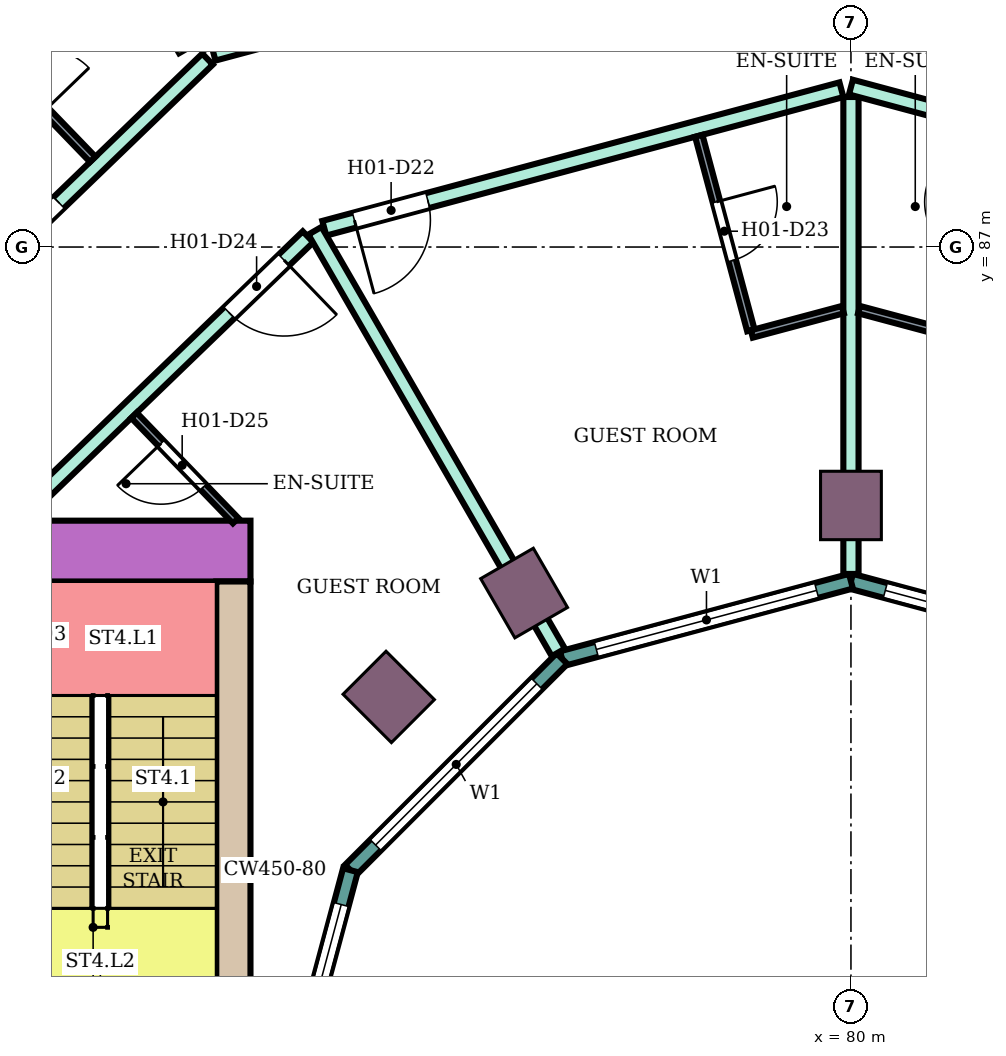
"""IFC4 building model, lengths in metres.
Left out: names, types, materials, properties, quantities, classifications, styles, units other than length and angle.
Written with IfcOpenShell. Run it as: python <this file> out.ifc"""

import sys

from ifc_helpers import new_model, si_unit, direction, frame, frame_2d, origin, origin_2d, place, context, subcontext, project, spatial, rectangle, extrude, element, fill, save


model = new_model("IFC4")
c1 = context("Model", 3, precision=1e-05, world=origin(), true_north=direction((0.0, 1.0)))
c2 = subcontext(c1, "Body", "Model", "MODEL_VIEW")
j1 = project(units=[si_unit("LENGTHUNIT", "METRE"), si_unit("PLANEANGLEUNIT", "RADIAN")], contexts=[c1])
p1 = place(None, origin())
s1 = spatial("IfcSite", under=j1, at=p1, CompositionType="ELEMENT")
p2 = place(p1, origin())
s2 = spatial("IfcBuilding", under=s1, at=p2, CompositionType="ELEMENT")
p3 = place(p2, frame((0.0, 0.0, 36.4)))
s3 = spatial("IfcBuildingStorey", under=s2, at=p3, CompositionType="ELEMENT", Elevation=36.4)
p4 = place(p3, frame((71.2, 90.242, 0.0), z_axis=(0.0, 0.0, 1.0), x_axis=(-0.5, 0.866025403784, 0.0)))
e1 = element("IfcColumn", 1, at=p4, inside=s3, PredefinedType="COLUMN", context=c2, shape_type="SweptSolid", body=[
    extrude(rectangle(XDim=1.2, YDim=0.8, at=origin_2d()), origin(), (0.0, 0.0, 1.0), 3.8),
])
for number, where, z_axis, x_axis in (
    (2, (80.0, 83.6, 0.0), (0.0, 0.0, 1.0), (0.0, 1.0, 0.0)),
    (3, (75.7, 82.448, 0.0), (0.0, 0.0, 1.0), (-0.5, 0.866, 0.0)),
    (4, (73.919, 81.081, 0.0), (0.0, 0.0, 1.0), (-0.707, 0.707, 0.0)),
):
    element("IfcColumn", number, at=place(p3, frame(where, z_axis=z_axis, x_axis=x_axis)), inside=s3, PredefinedType="COLUMN", context=c2, shape_type="SweptSolid", body=[
        extrude(rectangle(XDim=0.9, YDim=0.8, at=origin_2d()), origin(), (0.0, 0.0, 1.0), 3.8),
    ])
p5 = place(p3, frame((72.1, 83.0, 0.0), z_axis=(0.0, 0.0, 1.0), x_axis=(-1.0, 0.0, 0.0)))
e5 = element("IfcWall", 5, at=p5, inside=s3, PredefinedType="SHEAR", context=c2, shape_type="SweptSolid", body=[
    extrude(rectangle(XDim=14.7, YDim=0.8, at=frame_2d((7.35, 0.0))), origin(), (0.0, 0.0, 1.0), 3.48),
])
p6 = place(p5, frame((4.2, 0.0, 0.0)))
e6 = element("IfcOpeningElement", 6, at=p6, cuts=e5, PredefinedType="OPENING", context=c2, shape_type="SweptSolid", body=[
    extrude(rectangle(XDim=2.4, YDim=2.4, at=frame_2d((1.2, 1.2))), frame((0.0, 0.41, 0.0), z_axis=(0.0, -1.0, 0.0), x_axis=(1.0, 0.0, 0.0)), (0.0, 0.0, 1.0), 0.82),
])
p7 = place(p3, frame((71.875, 82.6, 0.0), z_axis=(0.0, 0.0, 1.0), x_axis=(0.0, -1.0, 0.0)))
e7 = element("IfcWall", 7, at=p7, inside=s3, PredefinedType="SHEAR", context=c2, shape_type="SweptSolid", body=[
    extrude(rectangle(XDim=7.6, YDim=0.45, at=frame_2d((3.8, 0.0))), origin(), (0.0, 0.0, 1.0), 3.48),
])
p8 = place(p3, frame((83.802, 81.585, 0.0), z_axis=(0.0, 0.0, 1.0), x_axis=(-0.965933654434, 0.258789828301, 0.0)))
e8 = element("IfcWall", 8, at=p8, inside=s3, PredefinedType="NOTDEFINED", context=c2, shape_type="SweptSolid", body=[
    extrude(rectangle(XDim=3.936, YDim=0.2, at=frame_2d((1.968, 0.0))), origin(), (0.0, 0.0, 1.0), 3.8),
])
p9 = place(p8, frame((0.468, 0.0, 0.9)))
e9 = element("IfcOpeningElement", 9, at=p9, cuts=e8, PredefinedType="OPENING", context=c2, shape_type="SweptSolid", body=[
    extrude(rectangle(XDim=3.0, YDim=2.3, at=frame_2d((1.5, 1.15))), frame((0.0, 0.11, 0.0), z_axis=(0.0, -1.0, 0.0), x_axis=(1.0, 0.0, 0.0)), (0.0, 0.0, 1.0), 0.22),
])
p10 = place(p3, frame((80.0, 82.604, 0.0), z_axis=(0.0, 0.0, 1.0), x_axis=(-0.965933654434, -0.258789828301, 0.0)))
e10 = element("IfcWall", 10, at=p10, inside=s3, PredefinedType="NOTDEFINED", context=c2, shape_type="SweptSolid", body=[
    extrude(rectangle(XDim=3.936, YDim=0.2, at=frame_2d((1.968, 0.0))), origin(), (0.0, 0.0, 1.0), 3.8),
])
p11 = place(p10, frame((0.468, 0.0, 0.9)))
e11 = element("IfcOpeningElement", 11, at=p11, cuts=e10, PredefinedType="OPENING", context=c2, shape_type="SweptSolid", body=[
    extrude(rectangle(XDim=3.0, YDim=2.3, at=frame_2d((1.5, 1.15))), frame((0.0, 0.11, 0.0), z_axis=(0.0, -1.0, 0.0), x_axis=(1.0, 0.0, 0.0)), (0.0, 0.0, 1.0), 0.22),
])
p12 = place(p3, frame((76.198, 81.585, 0.0), z_axis=(0.0, 0.0, 1.0), x_axis=(-0.707106781187, -0.707106781187, 0.0)))
e12 = element("IfcWall", 12, at=p12, inside=s3, PredefinedType="NOTDEFINED", context=c2, shape_type="SweptSolid", body=[
    extrude(rectangle(XDim=3.936, YDim=0.2, at=frame_2d((1.968, 0.0))), origin(), (0.0, 0.0, 1.0), 3.8),
])
p13 = place(p12, frame((0.468, 0.0, 0.9)))
e13 = element("IfcOpeningElement", 13, at=p13, cuts=e12, PredefinedType="OPENING", context=c2, shape_type="SweptSolid", body=[
    extrude(rectangle(XDim=3.0, YDim=2.3, at=frame_2d((1.5, 1.15))), frame((0.0, 0.11, 0.0), z_axis=(0.0, -1.0, 0.0), x_axis=(1.0, 0.0, 0.0)), (0.0, 0.0, 1.0), 0.22),
])
p14 = place(p3, frame((73.415, 78.802, 0.0), z_axis=(0.0, 0.0, 1.0), x_axis=(-0.258789828301, -0.965933654434, 0.0)))
e14 = element("IfcWall", 14, at=p14, inside=s3, PredefinedType="NOTDEFINED", context=c2, shape_type="SweptSolid", body=[
    extrude(rectangle(XDim=3.936, YDim=0.2, at=frame_2d((1.968, 0.0))), origin(), (0.0, 0.0, 1.0), 3.8),
])
p15 = place(p14, frame((0.468, 0.0, 0.9)))
e15 = element("IfcOpeningElement", 15, at=p15, cuts=e14, PredefinedType="OPENING", context=c2, shape_type="SweptSolid", body=[
    extrude(rectangle(XDim=3.0, YDim=2.3, at=frame_2d((1.5, 1.15))), frame((0.0, 0.11, 0.0), z_axis=(0.0, -1.0, 0.0), x_axis=(1.0, 0.0, 0.0)), (0.0, 0.0, 1.0), 0.22),
])
p16 = place(p3, frame((66.796, 84.9, 0.0), z_axis=(0.0, 0.0, 1.0), x_axis=(0.719690131178, 0.694295409092, 0.0)))
e16 = element("IfcWall", 16, at=p16, inside=s3, PredefinedType="PARTITIONING", context=c2, shape_type="SweptSolid", body=[
    extrude(rectangle(XDim=6.585, YDim=0.2, at=frame_2d((3.293, 0.0))), origin(), (0.0, 0.0, 1.0), 3.35),
])
p17 = place(p16, frame((2.867, 0.0, 0.0)))
e17 = element("IfcOpeningElement", 17, at=p17, cuts=e16, PredefinedType="OPENING", context=c2, shape_type="SweptSolid", body=[
    extrude(rectangle(XDim=1.0, YDim=2.1, at=frame_2d((0.5, 1.05))), frame((0.0, 0.11, 0.0), z_axis=(0.0, -1.0, 0.0), x_axis=(1.0, 0.0, 0.0)), (0.0, 0.0, 1.0), 0.22),
])
p18 = place(p3, frame((68.987, 83.4, 0.0), z_axis=(0.0, 0.0, 1.0), x_axis=(0.719591503389, 0.694397629784, 0.0)))
e18 = element("IfcWall", 18, at=p18, inside=s3, PredefinedType="PARTITIONING", context=c2, shape_type="SweptSolid", body=[
    extrude(rectangle(XDim=5.378, YDim=0.2, at=frame_2d((2.689, 0.0))), origin(), (0.0, 0.0, 1.0), 3.35),
])
p19 = place(p18, frame((3.938, 0.0, 0.0)))
e19 = element("IfcOpeningElement", 19, at=p19, cuts=e18, PredefinedType="OPENING", context=c2, shape_type="SweptSolid", body=[
    extrude(rectangle(XDim=1.0, YDim=2.1, at=frame_2d((0.5, 1.05))), frame((0.0, 0.11, 0.0), z_axis=(0.0, -1.0, 0.0), x_axis=(1.0, 0.0, 0.0)), (0.0, 0.0, 1.0), 0.22),
])
p20 = place(p3, frame((71.614, 89.55, 0.0), z_axis=(0.0, 0.0, 1.0), x_axis=(0.965982156828, 0.258608725086, 0.0)))
e20 = element("IfcWall", 20, at=p20, inside=s3, PredefinedType="PARTITIONING", context=c2, shape_type="SweptSolid", body=[
    extrude(rectangle(XDim=8.592, YDim=0.2, at=frame_2d((4.296, 0.0))), origin(), (0.0, 0.0, 1.0), 3.35),
])
p21 = place(p20, frame((4.865, 0.0, 0.0)))
e21 = element("IfcOpeningElement", 21, at=p21, cuts=e20, PredefinedType="OPENING", context=c2, shape_type="SweptSolid", body=[
    extrude(rectangle(XDim=1.0, YDim=2.1, at=frame_2d((0.5, 1.05))), frame((0.0, 0.11, 0.0), z_axis=(0.0, -1.0, 0.0), x_axis=(1.0, 0.0, 0.0)), (0.0, 0.0, 1.0), 0.22),
])
p22 = place(p20, frame((2.804, 0.0, 0.0)))
e22 = element("IfcOpeningElement", 22, at=p22, cuts=e20, PredefinedType="OPENING", context=c2, shape_type="SweptSolid", body=[
    extrude(rectangle(XDim=1.0, YDim=2.1, at=frame_2d((0.5, 1.05))), frame((0.0, 0.11, 0.0), z_axis=(0.0, -1.0, 0.0), x_axis=(1.0, 0.0, 0.0)), (0.0, 0.0, 1.0), 0.22),
])
p23 = place(p3, frame((73.071, 87.247, 0.0), z_axis=(0.0, 0.0, 1.0), x_axis=(0.965931651205, 0.258797305243, 0.0)))
e23 = element("IfcWall", 23, at=p23, inside=s3, PredefinedType="PARTITIONING", context=c2, shape_type="SweptSolid", body=[
    extrude(rectangle(XDim=7.043, YDim=0.2, at=frame_2d((3.521, 0.0))), origin(), (0.0, 0.0, 1.0), 3.35),
])
p24 = place(p23, frame((0.41, 0.0, 0.0)))
e24 = element("IfcOpeningElement", 24, at=p24, cuts=e23, PredefinedType="OPENING", context=c2, shape_type="SweptSolid", body=[
    extrude(rectangle(XDim=1.0, YDim=2.1, at=frame_2d((0.5, 1.05))), frame((0.0, 0.11, 0.0), z_axis=(0.0, -1.0, 0.0), x_axis=(1.0, 0.0, 0.0)), (0.0, 0.0, 1.0), 0.22),
])
p25 = place(p3, frame((72.948, 87.214, 0.0), z_axis=(0.0, 0.0, 1.0), x_axis=(0.499943524694, -0.866058007363, 0.0)))
e25 = element("IfcWall", 25, at=p25, inside=s3, PredefinedType="PARTITIONING", context=c2, shape_type="SweptSolid", body=[
    extrude(rectangle(XDim=6.405, YDim=0.2, at=frame_2d((3.203, 0.0))), origin(), (0.0, 0.0, 1.0), 3.35),
])
p26 = place(p3, frame((80.0, 82.699, 0.0), z_axis=(0.0, 0.0, 1.0), x_axis=(0.0, 1.0, 0.0)))
e26 = element("IfcWall", 26, at=p26, inside=s3, PredefinedType="PARTITIONING", context=c2, shape_type="SweptSolid", body=[
    extrude(rectangle(XDim=6.275, YDim=0.2, at=frame_2d((3.138, 0.0))), origin(), (0.0, 0.0, 1.0), 3.35),
])
p27 = place(p3, frame((80.0, 89.104, 0.0), z_axis=(0.0, 0.0, 1.0), x_axis=(0.965856548257, -0.259077455964, 0.0)))
e27 = element("IfcWall", 27, at=p27, inside=s3, PredefinedType="PARTITIONING", context=c2, shape_type="SweptSolid", body=[
    extrude(rectangle(XDim=7.173, YDim=0.2, at=frame_2d((3.586, 0.0))), origin(), (0.0, 0.0, 1.0), 3.35),
])
p28 = place(p27, frame((5.763, 0.0, 0.0)))
e28 = element("IfcOpeningElement", 28, at=p28, cuts=e27, PredefinedType="OPENING", context=c2, shape_type="SweptSolid", body=[
    extrude(rectangle(XDim=1.0, YDim=2.1, at=frame_2d((0.5, 1.05))), frame((0.0, 0.11, 0.0), z_axis=(0.0, -1.0, 0.0), x_axis=(1.0, 0.0, 0.0)), (0.0, 0.0, 1.0), 0.22),
])
p29 = place(p3, frame((80.0, 91.797, 0.0), z_axis=(0.0, 0.0, 1.0), x_axis=(0.965857042792, -0.259075612301, 0.0)))
e29 = element("IfcWall", 29, at=p29, inside=s3, PredefinedType="PARTITIONING", context=c2, shape_type="SweptSolid", body=[
    extrude(rectangle(XDim=8.602, YDim=0.2, at=frame_2d((4.301, 0.0))), origin(), (0.0, 0.0, 1.0), 3.35),
])
p30 = place(p29, frame((4.877, 0.0, 0.0)))
e30 = element("IfcOpeningElement", 30, at=p30, cuts=e29, PredefinedType="OPENING", context=c2, shape_type="SweptSolid", body=[
    extrude(rectangle(XDim=1.0, YDim=2.1, at=frame_2d((0.5, 1.05))), frame((0.0, 0.11, 0.0), z_axis=(0.0, -1.0, 0.0), x_axis=(1.0, 0.0, 0.0)), (0.0, 0.0, 1.0), 0.22),
])
p31 = place(p29, frame((2.73, 0.0, 0.0)))
e31 = element("IfcOpeningElement", 31, at=p31, cuts=e29, PredefinedType="OPENING", context=c2, shape_type="SweptSolid", body=[
    extrude(rectangle(XDim=1.1, YDim=2.1, at=frame_2d((0.55, 1.05))), frame((0.0, 0.11, 0.0), z_axis=(0.0, -1.0, 0.0), x_axis=(1.0, 0.0, 0.0)), (0.0, 0.0, 1.0), 0.22),
])
p32 = place(p3, frame((68.185, 90.06, 0.0), z_axis=(0.0, 0.0, 1.0), x_axis=(0.69446127412, -0.719530081892, 0.0)))
e32 = element("IfcWall", 32, at=p32, inside=s3, PredefinedType="PARTITIONING", context=c2, shape_type="SweptSolid", body=[
    extrude(rectangle(XDim=2.649, YDim=0.1, at=frame_2d((1.324, 0.0))), origin(), (0.0, 0.0, 1.0), 3.35),
])
p33 = place(p32, frame((0.95, 0.0, 0.0)))
e33 = element("IfcOpeningElement", 33, at=p33, cuts=e32, PredefinedType="OPENING", context=c2, shape_type="SweptSolid", body=[
    extrude(rectangle(XDim=0.8, YDim=2.1, at=frame_2d((0.4, 1.05))), frame((0.0, 0.06, 0.0), z_axis=(0.0, -1.0, 0.0), x_axis=(1.0, 0.0, 0.0)), (0.0, 0.0, 1.0), 0.12),
])
p34 = place(p3, frame((70.567, 84.786, 0.0), z_axis=(0.0, 0.0, 1.0), x_axis=(0.694447472534, -0.719543402368, 0.0)))
e34 = element("IfcWall", 34, at=p34, inside=s3, PredefinedType="PARTITIONING", context=c2, shape_type="SweptSolid", body=[
    extrude(rectangle(XDim=1.926, YDim=0.1, at=frame_2d((0.963, 0.0))), origin(), (0.0, 0.0, 1.0), 3.35),
])
p35 = place(p34, frame((0.513, 0.0, 0.0)))
e35 = element("IfcOpeningElement", 35, at=p35, cuts=e34, PredefinedType="OPENING", context=c2, shape_type="SweptSolid", body=[
    extrude(rectangle(XDim=0.8, YDim=2.1, at=frame_2d((0.4, 1.05))), frame((0.0, 0.06, 0.0), z_axis=(0.0, -1.0, 0.0), x_axis=(1.0, 0.0, 0.0)), (0.0, 0.0, 1.0), 0.12),
])
p36 = place(p3, frame((77.998, 88.463, 0.0), z_axis=(0.0, 0.0, 1.0), x_axis=(0.258677737588, -0.965963678446, 0.0)))
e36 = element("IfcWall", 36, at=p36, inside=s3, PredefinedType="PARTITIONING", context=c2, shape_type="SweptSolid", body=[
    extrude(rectangle(XDim=2.649, YDim=0.1, at=frame_2d((1.325, 0.0))), origin(), (0.0, 0.0, 1.0), 3.35),
])
p37 = place(p36, frame((0.9, 0.0, 0.0)))
e37 = element("IfcOpeningElement", 37, at=p37, cuts=e36, PredefinedType="OPENING", context=c2, shape_type="SweptSolid", body=[
    extrude(rectangle(XDim=0.8, YDim=2.1, at=frame_2d((0.4, 1.05))), frame((0.0, 0.06, 0.0), z_axis=(0.0, -1.0, 0.0), x_axis=(1.0, 0.0, 0.0)), (0.0, 0.0, 1.0), 0.12),
])
p38 = place(p3, frame((78.696, 85.856, 0.0), z_axis=(0.0, 0.0, 1.0), x_axis=(0.966002513606, 0.258532674351, 0.0)))
e38 = element("IfcWall", 38, at=p38, inside=s3, PredefinedType="PARTITIONING", context=c2, shape_type="SweptSolid", body=[
    extrude(rectangle(XDim=1.24, YDim=0.1, at=frame_2d((0.62, 0.0))), origin(), (0.0, 0.0, 1.0), 3.35),
])
p39 = place(p3, frame((80.106, 86.177, 0.0), z_axis=(0.0, 0.0, 1.0), x_axis=(0.966002973184, -0.258530957139, 0.0)))
e39 = element("IfcWall", 39, at=p39, inside=s3, PredefinedType="PARTITIONING", context=c2, shape_type="SweptSolid", body=[
    extrude(rectangle(XDim=1.19, YDim=0.1, at=frame_2d((0.595, 0.0))), origin(), (0.0, 0.0, 1.0), 3.35),
])
p40 = place(p9, origin())
e40 = element("IfcWindow", 40, at=p40, inside=s3, PartitioningType="SINGLE_PANEL", PredefinedType="WINDOW", context=c2, shape_type="SweptSolid", body=[
    extrude(rectangle(XDim=3.0, YDim=2.3, at=frame_2d((1.5, 1.15))), frame((0.0, 0.03, 0.0), z_axis=(0.0, -1.0, 0.0), x_axis=(1.0, 0.0, 0.0)), (0.0, 0.0, 1.0), 0.06),
])
fill(e9, e40)
p41 = place(p11, origin())
e41 = element("IfcWindow", 41, at=p41, inside=s3, PartitioningType="SINGLE_PANEL", PredefinedType="WINDOW", context=c2, shape_type="SweptSolid", body=[
    extrude(rectangle(XDim=3.0, YDim=2.3, at=frame_2d((1.5, 1.15))), frame((0.0, 0.03, 0.0), z_axis=(0.0, -1.0, 0.0), x_axis=(1.0, 0.0, 0.0)), (0.0, 0.0, 1.0), 0.06),
])
fill(e11, e41)
p42 = place(p13, origin())
e42 = element("IfcWindow", 42, at=p42, inside=s3, PartitioningType="SINGLE_PANEL", PredefinedType="WINDOW", context=c2, shape_type="SweptSolid", body=[
    extrude(rectangle(XDim=3.0, YDim=2.3, at=frame_2d((1.5, 1.15))), frame((0.0, 0.03, 0.0), z_axis=(0.0, -1.0, 0.0), x_axis=(1.0, 0.0, 0.0)), (0.0, 0.0, 1.0), 0.06),
])
fill(e13, e42)
p43 = place(p15, origin())
e43 = element("IfcWindow", 43, at=p43, inside=s3, PartitioningType="SINGLE_PANEL", PredefinedType="WINDOW", context=c2, shape_type="SweptSolid", body=[
    extrude(rectangle(XDim=3.0, YDim=2.3, at=frame_2d((1.5, 1.15))), frame((0.0, 0.03, 0.0), z_axis=(0.0, -1.0, 0.0), x_axis=(1.0, 0.0, 0.0)), (0.0, 0.0, 1.0), 0.06),
])
fill(e15, e43)
p44 = place(p17, origin())
e44 = element("IfcDoor", 44, at=p44, inside=s3, OperationType="SINGLE_SWING_LEFT", PredefinedType="DOOR", context=c2, shape_type="SweptSolid", body=[
    extrude(rectangle(XDim=1.0, YDim=2.1, at=frame_2d((0.5, 1.05))), frame((0.0, 0.025, 0.0), z_axis=(0.0, -1.0, 0.0), x_axis=(1.0, 0.0, 0.0)), (0.0, 0.0, 1.0), 0.05),
])
fill(e17, e44)
p45 = place(p24, frame((1.0, 0.0, 0.0), z_axis=(0.0, 0.0, 1.0), x_axis=(-1.0, 0.0, 0.0)))
e45 = element("IfcDoor", 45, at=p45, inside=s3, OperationType="SINGLE_SWING_RIGHT", PredefinedType="DOOR", context=c2, shape_type="SweptSolid", body=[
    extrude(rectangle(XDim=1.0, YDim=2.1, at=frame_2d((0.5, 1.05))), frame((0.0, 0.025, 0.0), z_axis=(0.0, -1.0, 0.0), x_axis=(1.0, 0.0, 0.0)), (0.0, 0.0, 1.0), 0.05),
])
fill(e24, e45)
p46 = place(p37, origin())
e46 = element("IfcDoor", 46, at=p46, inside=s3, OperationType="SINGLE_SWING_LEFT", PredefinedType="DOOR", context=c2, shape_type="SweptSolid", body=[
    extrude(rectangle(XDim=0.8, YDim=2.1, at=frame_2d((0.4, 1.05))), frame((0.0, 0.025, 0.0), z_axis=(0.0, -1.0, 0.0), x_axis=(1.0, 0.0, 0.0)), (0.0, 0.0, 1.0), 0.05),
])
fill(e37, e46)
p47 = place(p19, frame((1.0, 0.0, 0.0), z_axis=(0.0, 0.0, 1.0), x_axis=(-1.0, 0.0, 0.0)))
e47 = element("IfcDoor", 47, at=p47, inside=s3, OperationType="SINGLE_SWING_LEFT", PredefinedType="DOOR", context=c2, shape_type="SweptSolid", body=[
    extrude(rectangle(XDim=1.0, YDim=2.1, at=frame_2d((0.5, 1.05))), frame((0.0, 0.025, 0.0), z_axis=(0.0, -1.0, 0.0), x_axis=(1.0, 0.0, 0.0)), (0.0, 0.0, 1.0), 0.05),
])
fill(e19, e47)
p48 = place(p35, frame((0.8, 0.0, 0.0), z_axis=(0.0, 0.0, 1.0), x_axis=(-1.0, 0.0, 0.0)))
e48 = element("IfcDoor", 48, at=p48, inside=s3, OperationType="SINGLE_SWING_RIGHT", PredefinedType="DOOR", context=c2, shape_type="SweptSolid", body=[
    extrude(rectangle(XDim=0.8, YDim=2.1, at=frame_2d((0.4, 1.05))), frame((0.0, 0.025, 0.0), z_axis=(0.0, -1.0, 0.0), x_axis=(1.0, 0.0, 0.0)), (0.0, 0.0, 1.0), 0.05),
])
fill(e35, e48)
save(model, sys.argv[1])
